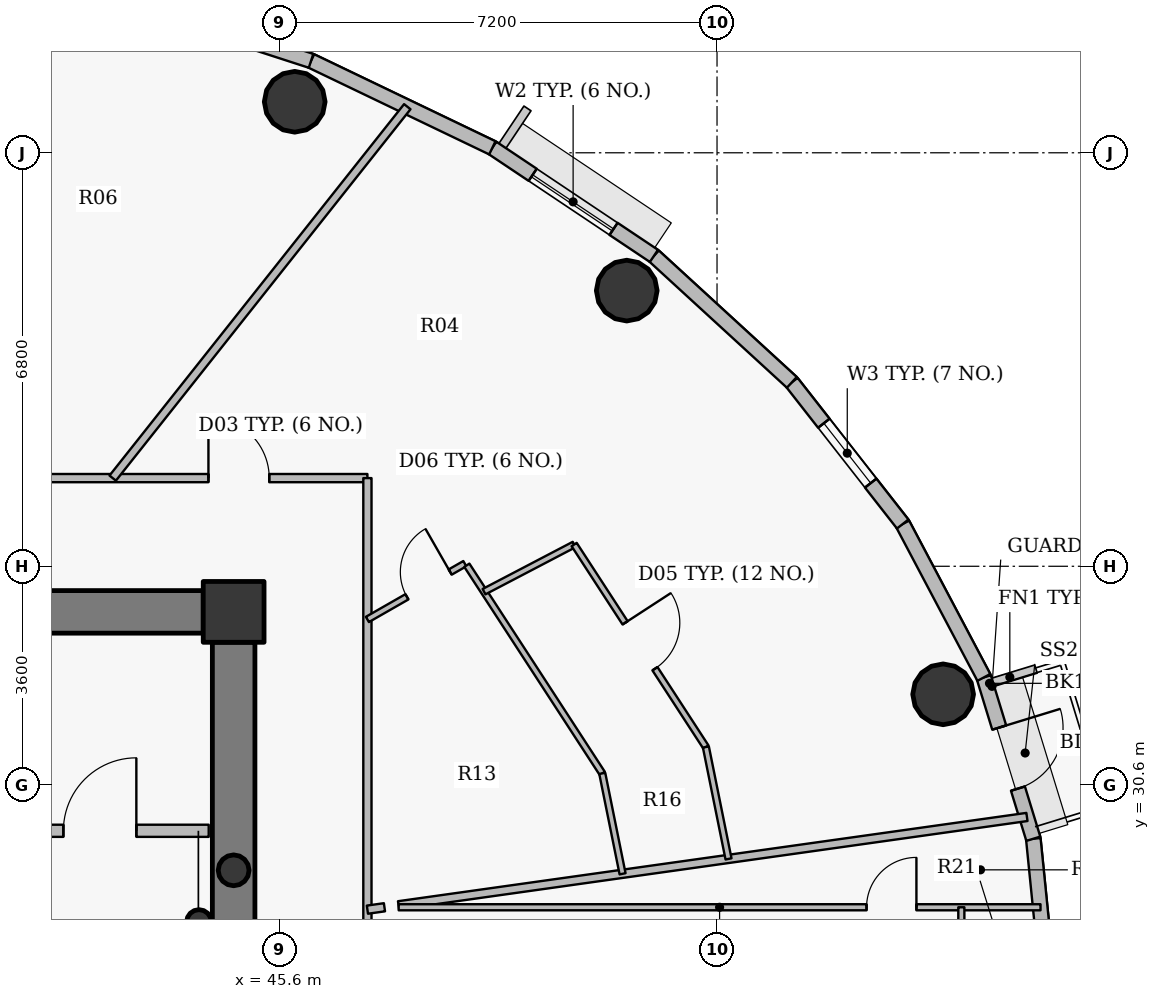
"""IFC4 building model, lengths in metres.
Left out: names, types, materials, properties, quantities, classifications, styles, units other than length and angle.
Written with IfcOpenShell. Run it as: python <this file> out.ifc"""

import sys

from ifc_helpers import new_model, si_unit, direction, frame, frame_2d, origin, origin_2d, place, context, subcontext, project, spatial, rectangle, hollow_circle, extrude, source, transform, mapped, element, fill, save


model = new_model("IFC4")
c1 = context("Model", 3, precision=1e-05, world=origin(), true_north=direction((0.0, 1.0)))
c2 = subcontext(c1, "Body", "Model", "MODEL_VIEW")
j1 = project(units=[si_unit("LENGTHUNIT", "METRE"), si_unit("PLANEANGLEUNIT", "RADIAN")], contexts=[c1])
p1 = place(None, origin())
s1 = spatial("IfcSite", under=j1, at=p1, CompositionType="ELEMENT")
p2 = place(p1, origin())
s2 = spatial("IfcBuilding", under=s1, at=p2, CompositionType="ELEMENT")
p3 = place(p2, frame((0.0, 0.0, 280.5)))
s3 = spatial("IfcBuildingStorey", under=s2, at=p3, CompositionType="ELEMENT", Elevation=280.5)
p4 = place(p3, frame((44.85, 33.45, 0.0), z_axis=(0.0, 0.0, 1.0), x_axis=(1.0, 0.0, 0.0)))
e1 = element("IfcColumn", 1, at=p4, inside=s3, PredefinedType="COLUMN", context=c2, shape_type="SweptSolid", body=[
    extrude(rectangle(XDim=1.0, YDim=1.0, at=origin_2d()), origin(), (0.0, 0.0, 1.0), 3.75),
])
p5 = place(p3, frame((44.28, 28.35, 0.0), z_axis=(0.0, 0.0, 1.0), x_axis=(1.0, 0.0, 0.0)))
e2 = element("IfcColumn", 2, at=p5, inside=s3, PredefinedType="COLUMN", context=c2, shape_type="SweptSolid", body=[
    extrude(hollow_circle(Radius=0.203, WallThickness=0.016, at=origin_2d()), origin(), (0.0, 0.0, 1.0), 3.75),
])
p6 = place(p3, frame((27.65, 33.45, 0.0), z_axis=(0.0, 0.0, 1.0), x_axis=(1.0, 0.0, 0.0)))
e3 = element("IfcWall", 3, at=p6, inside=s3, PredefinedType="SHEAR", context=c2, shape_type="SweptSolid", body=[
    extrude(rectangle(XDim=16.7, YDim=0.7, at=frame_2d((8.35, 0.0))), origin(), (0.0, 0.0, 1.0), 3.05),
])
p7 = place(p6, frame((12.775, 0.0, 0.0)))
e4 = element("IfcOpeningElement", 4, at=p7, cuts=e3, PredefinedType="OPENING", context=c2, shape_type="SweptSolid", body=[
    extrude(rectangle(XDim=1.15, YDim=2.15, at=origin_2d()), frame((0.575, 0.36, 1.075), z_axis=(0.0, -1.0, 0.0), x_axis=(1.0, 0.0, 0.0)), (0.0, 0.0, 1.0), 0.72),
])
p8 = place(p3, frame((44.85, 32.95, 0.0), z_axis=(0.0, 0.0, 1.0), x_axis=(0.0, -1.0, 0.0)))
e5 = element("IfcWall", 5, at=p8, inside=s3, PredefinedType="SHEAR", context=c2, shape_type="SweptSolid", body=[
    extrude(rectangle(XDim=11.9, YDim=0.7, at=frame_2d((5.95, 0.0))), origin(), (0.0, 0.0, 1.0), 3.05),
])
for number, where, z_axis, x_axis in (
    (6, (56.519, 32.094, 0.0), (0.0, 0.0, 1.0), (1.0, 0.0, 0.0)),
    (7, (51.315, 38.733, 0.0), (0.0, 0.0, 1.0), (1.0, 0.0, 0.0)),
    (8, (45.854, 41.839, 0.0), (0.0, 0.0, 1.0), (1.0, 0.0, 0.0)),
):
    element("IfcColumn", number, at=place(p3, frame(where, z_axis=z_axis, x_axis=x_axis)), inside=s3, PredefinedType="COLUMN", context=c2, shape_type="SweptSolid", body=[
        extrude(hollow_circle(Radius=0.5, WallThickness=0.032, at=origin_2d()), origin(), (0.0, 0.0, 1.0), 3.75),
    ])
p9 = place(p3, frame((44.85, 29.2, 0.0), z_axis=(0.0, 0.0, 1.0), x_axis=(1.0, 0.0, 0.0)))
e9 = element("IfcColumn", 9, at=p9, inside=s3, PredefinedType="COLUMN", context=c2, shape_type="SweptSolid", body=[
    extrude(hollow_circle(Radius=0.254, WallThickness=0.02, at=origin_2d()), origin(), (0.0, 0.0, 1.0), 3.75),
])
p10 = place(p3, frame((58.002, 29.719, 0.0), z_axis=(0.0, 0.0, 1.0), x_axis=(0.099972526841, -0.99499019788, 0.0)))
e10 = element("IfcWall", 10, at=p10, inside=s3, PredefinedType="SOLIDWALL", context=c2, shape_type="SweptSolid", body=[
    extrude(rectangle(XDim=2.733, YDim=0.24, at=frame_2d((1.366, 0.0))), origin(), (0.0, 0.0, 1.0), 3.5),
])
p11 = place(p3, frame((57.188, 32.372, 0.0), z_axis=(0.0, 0.0, 1.0), x_axis=(0.2931213403, -0.956075248012, 0.0)))
e11 = element("IfcWall", 11, at=p11, inside=s3, PredefinedType="SOLIDWALL", context=c2, shape_type="SweptSolid", body=[
    extrude(rectangle(XDim=2.775, YDim=0.24, at=frame_2d((1.388, 0.0))), origin(), (0.0, 0.0, 1.0), 3.5),
])
p12 = place(p11, frame((0.863, 0.0, 0.0)))
e12 = element("IfcOpeningElement", 12, at=p12, cuts=e11, PredefinedType="OPENING", context=c2, shape_type="SweptSolid", body=[
    extrude(rectangle(XDim=1.05, YDim=2.15, at=origin_2d()), frame((0.525, 0.13, 1.075), z_axis=(0.0, -1.0, 0.0), x_axis=(1.0, 0.0, 0.0)), (0.0, 0.0, 1.0), 0.26),
])
p13 = place(p3, frame((55.854, 34.895, 0.0), z_axis=(0.0, 0.0, 1.0), x_axis=(0.467628269026, -0.883925224218, 0.0)))
e13 = element("IfcWall", 13, at=p13, inside=s3, PredefinedType="SOLIDWALL", context=c2, shape_type="SweptSolid", body=[
    extrude(rectangle(XDim=2.854, YDim=0.24, at=frame_2d((1.427, 0.0))), origin(), (0.0, 0.0, 1.0), 3.5),
])
p14 = place(p3, frame((54.03, 37.225, 0.0), z_axis=(0.0, 0.0, 1.0), x_axis=(0.616337186556, -0.787482363275, 0.0)))
e14 = element("IfcWall", 14, at=p14, inside=s3, PredefinedType="SOLIDWALL", context=c2, shape_type="SweptSolid", body=[
    extrude(rectangle(XDim=2.958, YDim=0.24, at=frame_2d((1.479, 0.0))), origin(), (0.0, 0.0, 1.0), 3.5),
])
p15 = place(p14, frame((0.854, 0.0, 0.9)))
e15 = element("IfcOpeningElement", 15, at=p15, cuts=e14, PredefinedType="OPENING", context=c2, shape_type="SweptSolid", body=[
    extrude(rectangle(XDim=1.25, YDim=1.65, at=origin_2d()), frame((0.625, 0.13, 0.825), z_axis=(0.0, -1.0, 0.0), x_axis=(1.0, 0.0, 0.0)), (0.0, 0.0, 1.0), 0.26),
])
p16 = place(p3, frame((51.762, 39.304, 0.0), z_axis=(0.0, 0.0, 1.0), x_axis=(0.737068506972, -0.675818034703, 0.0)))
e16 = element("IfcWall", 16, at=p16, inside=s3, PredefinedType="SOLIDWALL", context=c2, shape_type="SweptSolid", body=[
    extrude(rectangle(XDim=3.077, YDim=0.24, at=frame_2d((1.539, 0.0))), origin(), (0.0, 0.0, 1.0), 3.5),
])
p17 = place(p3, frame((49.104, 41.082, 0.0), z_axis=(0.0, 0.0, 1.0), x_axis=(0.831250592635, -0.55589787933, 0.0)))
e17 = element("IfcWall", 17, at=p17, inside=s3, PredefinedType="SOLIDWALL", context=c2, shape_type="SweptSolid", body=[
    extrude(rectangle(XDim=3.197, YDim=0.24, at=frame_2d((1.599, 0.0))), origin(), (0.0, 0.0, 1.0), 3.5),
])
p18 = place(p17, frame((0.798, 0.0, 0.9)))
e18 = element("IfcOpeningElement", 18, at=p18, cuts=e17, PredefinedType="OPENING", context=c2, shape_type="SweptSolid", body=[
    extrude(rectangle(XDim=1.6, YDim=1.75, at=origin_2d()), frame((0.8, 0.13, 0.875), z_axis=(0.0, -1.0, 0.0), x_axis=(1.0, 0.0, 0.0)), (0.0, 0.0, 1.0), 0.26),
])
p19 = place(p3, frame((46.123, 42.512, 0.0), z_axis=(0.0, 0.0, 1.0), x_axis=(0.901573741254, -0.43262546051, 0.0)))
e19 = element("IfcWall", 19, at=p19, inside=s3, PredefinedType="SOLIDWALL", context=c2, shape_type="SweptSolid", body=[
    extrude(rectangle(XDim=3.307, YDim=0.24, at=frame_2d((1.653, 0.0))), origin(), (0.0, 0.0, 1.0), 3.5),
])
p20 = place(p3, frame((42.891, 43.56, 0.0), z_axis=(0.0, 0.0, 1.0), x_axis=(0.95123136723, -0.308478339592, 0.0)))
e20 = element("IfcWall", 20, at=p20, inside=s3, PredefinedType="SOLIDWALL", context=c2, shape_type="SweptSolid", body=[
    extrude(rectangle(XDim=3.398, YDim=0.24, at=frame_2d((1.699, 0.0))), origin(), (0.0, 0.0, 1.0), 3.5),
])
p21 = place(p20, frame((0.899, 0.0, 0.9)))
e21 = element("IfcOpeningElement", 21, at=p21, cuts=e20, PredefinedType="OPENING", context=c2, shape_type="SweptSolid", body=[
    extrude(rectangle(XDim=1.6, YDim=1.75, at=origin_2d()), frame((0.8, 0.13, 0.875), z_axis=(0.0, -1.0, 0.0), x_axis=(1.0, 0.0, 0.0)), (0.0, 0.0, 1.0), 0.26),
])
p22 = place(p3, frame((35.95, 29.85, 0.0), z_axis=(0.0, 0.0, 1.0), x_axis=(1.0, 0.0, 0.0)))
e22 = element("IfcWall", 22, at=p22, inside=s3, PredefinedType="PARTITIONING", context=c2, shape_type="SweptSolid", body=[
    extrude(rectangle(XDim=8.49, YDim=0.2, at=frame_2d((4.245, 0.0))), origin(), (0.0, 0.0, 1.0), 3.085),
])
p23 = place(p22, frame((6.1, 0.0, 0.0)))
e23 = element("IfcOpeningElement", 23, at=p23, cuts=e22, PredefinedType="OPENING", context=c2, shape_type="SweptSolid", body=[
    extrude(rectangle(XDim=1.2, YDim=2.15, at=origin_2d()), frame((0.6, 0.11, 1.075), z_axis=(0.0, -1.0, 0.0), x_axis=(1.0, 0.0, 0.0)), (0.0, 0.0, 1.0), 0.22),
])
p24 = place(p22, frame((0.37, 0.0, 0.0)))
e24 = element("IfcOpeningElement", 24, at=p24, cuts=e22, PredefinedType="OPENING", context=c2, shape_type="SweptSolid", body=[
    extrude(rectangle(XDim=1.15, YDim=2.15, at=origin_2d()), frame((0.575, 0.11, 1.075), z_axis=(0.0, -1.0, 0.0), x_axis=(1.0, 0.0, 0.0)), (0.0, 0.0, 1.0), 0.22),
])
p25 = place(p22, frame((2.425, 0.0, 0.0)))
e25 = element("IfcOpeningElement", 25, at=p25, cuts=e22, PredefinedType="OPENING", context=c2, shape_type="SweptSolid", body=[
    extrude(rectangle(XDim=1.05, YDim=2.15, at=origin_2d()), frame((0.525, 0.11, 1.075), z_axis=(0.0, -1.0, 0.0), x_axis=(1.0, 0.0, 0.0)), (0.0, 0.0, 1.0), 0.22),
])
p26 = place(p3, frame((36.95, 35.65, 0.0), z_axis=(0.0, 0.0, 1.0), x_axis=(1.0, 0.0, 0.0)))
e26 = element("IfcWall", 26, at=p26, inside=s3, PredefinedType="PARTITIONING", context=c2, shape_type="SweptSolid", body=[
    extrude(rectangle(XDim=10.1, YDim=0.135, at=frame_2d((5.05, 0.0))), origin(), (0.0, 0.0, 1.0), 3.035),
])
p27 = place(p26, frame((7.486, 0.0, 0.0)))
e27 = element("IfcOpeningElement", 27, at=p27, cuts=e26, PredefinedType="OPENING", context=c2, shape_type="SweptSolid", body=[
    extrude(rectangle(XDim=1.0, YDim=2.15, at=origin_2d()), frame((0.5, 0.078, 1.075), z_axis=(0.0, -1.0, 0.0), x_axis=(1.0, 0.0, 0.0)), (0.0, 0.0, 1.0), 0.155),
])
p28 = place(p26, frame((3.272, 0.0, 0.0)))
e28 = element("IfcOpeningElement", 28, at=p28, cuts=e26, PredefinedType="OPENING", context=c2, shape_type="SweptSolid", body=[
    extrude(rectangle(XDim=1.0, YDim=2.15, at=origin_2d()), frame((0.5, 0.078, 1.075), z_axis=(0.0, -1.0, 0.0), x_axis=(1.0, 0.0, 0.0)), (0.0, 0.0, 1.0), 0.155),
])
p29 = place(p3, frame((42.861, 35.65, 0.0), z_axis=(0.0, 0.0, 1.0), x_axis=(0.621439784824, 0.783461928774, 0.0)))
e29 = element("IfcWall", 29, at=p29, inside=s3, PredefinedType="PARTITIONING", context=c2, shape_type="SweptSolid", body=[
    extrude(rectangle(XDim=7.796, YDim=0.135, at=frame_2d((3.898, 0.0))), origin(), (0.0, 0.0, 1.0), 2.985),
])
p30 = place(p3, frame((47.05, 18.503, 0.0), z_axis=(0.0, 0.0, 1.0), x_axis=(0.0, 1.0, 0.0)))
e30 = element("IfcWall", 30, at=p30, inside=s3, PredefinedType="PARTITIONING", context=c2, shape_type="SweptSolid", body=[
    extrude(rectangle(XDim=17.147, YDim=0.135, at=frame_2d((8.574, 0.0))), origin(), (0.0, 0.0, 1.0), 3.035),
])
p31 = place(p30, frame((4.545, 0.0, 0.0)))
e31 = element("IfcOpeningElement", 31, at=p31, cuts=e30, PredefinedType="OPENING", context=c2, shape_type="SweptSolid", body=[
    extrude(rectangle(XDim=1.0, YDim=2.15, at=origin_2d()), frame((0.5, 0.078, 1.075), z_axis=(0.0, -1.0, 0.0), x_axis=(1.0, 0.0, 0.0)), (0.0, 0.0, 1.0), 0.155),
])
p32 = place(p3, frame((47.05, 28.553, 0.0), z_axis=(0.0, 0.0, 1.0), x_axis=(0.990308552968, 0.138884736087, 0.0)))
e32 = element("IfcWall", 32, at=p32, inside=s3, PredefinedType="PARTITIONING", context=c2, shape_type="SweptSolid", body=[
    extrude(rectangle(XDim=0.283, YDim=0.135, at=frame_2d((0.142, 0.0))), origin(), (0.0, 0.0, 1.0), 3.5),
])
p33 = place(p3, frame((47.05, 33.326, 0.0), z_axis=(0.0, 0.0, 1.0), x_axis=(0.867827775188, 0.496865125172, 0.0)))
e33 = element("IfcWall", 33, at=p33, inside=s3, PredefinedType="PARTITIONING", context=c2, shape_type="SweptSolid", body=[
    extrude(rectangle(XDim=1.846, YDim=0.1, at=frame_2d((0.923, 0.0))), origin(), (0.0, 0.0, 1.0), 3.5),
])
p34 = place(p33, frame((0.749, 0.0, 0.0)))
e34 = element("IfcOpeningElement", 34, at=p34, cuts=e33, PredefinedType="OPENING", context=c2, shape_type="SweptSolid", body=[
    extrude(rectangle(XDim=0.82, YDim=2.1, at=origin_2d()), frame((0.41, 0.06, 1.05), z_axis=(0.0, -1.0, 0.0), x_axis=(1.0, 0.0, 0.0)), (0.0, 0.0, 1.0), 0.12),
])
p35 = place(p3, frame((47.562, 28.625, 0.0), z_axis=(0.0, 0.0, 1.0), x_axis=(0.990269276455, 0.139164507362, 0.0)))
e35 = element("IfcWall", 35, at=p35, inside=s3, PredefinedType="PARTITIONING", context=c2, shape_type="SweptSolid", body=[
    extrude(rectangle(XDim=10.437, YDim=0.135, at=frame_2d((5.218, 0.0))), origin(), (0.0, 0.0, 1.0), 2.985),
])
p36 = place(p3, frame((47.564, 28.592, 0.0), z_axis=(0.0, 0.0, 1.0), x_axis=(1.0, 0.0, 0.0)))
e36 = element("IfcWall", 36, at=p36, inside=s3, PredefinedType="PARTITIONING", context=c2, shape_type="SweptSolid", body=[
    extrude(rectangle(XDim=10.555, YDim=0.1, at=frame_2d((5.278, 0.0))), origin(), (0.0, 0.0, 1.0), 2.985),
])
p37 = place(p36, frame((7.695, 0.0, 0.0)))
e37 = element("IfcOpeningElement", 37, at=p37, cuts=e36, PredefinedType="OPENING", context=c2, shape_type="SweptSolid", body=[
    extrude(rectangle(XDim=0.82, YDim=2.1, at=origin_2d()), frame((0.41, 0.06, 1.05), z_axis=(0.0, -1.0, 0.0), x_axis=(1.0, 0.0, 0.0)), (0.0, 0.0, 1.0), 0.12),
])
p38 = place(p3, frame((48.685, 34.217, 0.0), z_axis=(0.0, 0.0, 1.0), x_axis=(0.54540855562, -0.8381703332, 0.0)))
e38 = element("IfcWall", 38, at=p38, inside=s3, PredefinedType="PARTITIONING", context=c2, shape_type="SweptSolid", body=[
    extrude(rectangle(XDim=4.084, YDim=0.1, at=frame_2d((2.042, 0.0))), origin(), (0.0, 0.0, 1.0), 3.035),
])
p39 = place(p3, frame((48.968, 33.782, 0.0), z_axis=(0.0, 0.0, 1.0), x_axis=(0.886102824681, 0.463488709779, 0.0)))
e39 = element("IfcWall", 39, at=p39, inside=s3, PredefinedType="PARTITIONING", context=c2, shape_type="SweptSolid", body=[
    extrude(rectangle(XDim=1.672, YDim=0.1, at=frame_2d((0.836, 0.0))), origin(), (0.0, 0.0, 1.0), 3.5),
])
p40 = place(p3, frame((50.45, 34.558, 0.0), z_axis=(0.0, 0.0, 1.0), x_axis=(0.545448348881, -0.838144437853, 0.0)))
e40 = element("IfcWall", 40, at=p40, inside=s3, PredefinedType="PARTITIONING", context=c2, shape_type="SweptSolid", body=[
    extrude(rectangle(XDim=3.973, YDim=0.1, at=frame_2d((1.986, 0.0))), origin(), (0.0, 0.0, 1.0), 3.035),
])
p41 = place(p40, frame((1.536, 0.0, 0.0)))
e41 = element("IfcOpeningElement", 41, at=p41, cuts=e40, PredefinedType="OPENING", context=c2, shape_type="SweptSolid", body=[
    extrude(rectangle(XDim=0.9, YDim=2.1, at=origin_2d()), frame((0.45, 0.06, 1.05), z_axis=(0.0, -1.0, 0.0), x_axis=(1.0, 0.0, 0.0)), (0.0, 0.0, 1.0), 0.12),
])
p42 = place(p3, frame((50.913, 30.794, 0.0), z_axis=(0.0, 0.0, 1.0), x_axis=(0.198233557602, -0.980154812588, 0.0)))
e42 = element("IfcWall", 42, at=p42, inside=s3, PredefinedType="PARTITIONING", context=c2, shape_type="SweptSolid", body=[
    extrude(rectangle(XDim=1.685, YDim=0.1, at=frame_2d((0.842, 0.0))), origin(), (0.0, 0.0, 1.0), 3.035),
])
p43 = place(p3, frame((52.617, 31.228, 0.0), z_axis=(0.0, 0.0, 1.0), x_axis=(0.198191443997, -0.980163329005, 0.0)))
e43 = element("IfcWall", 43, at=p43, inside=s3, PredefinedType="PARTITIONING", context=c2, shape_type="SweptSolid", body=[
    extrude(rectangle(XDim=1.877, YDim=0.1, at=frame_2d((0.939, 0.0))), origin(), (0.0, 0.0, 1.0), 3.035),
])
p44 = place(p3, frame((56.818, 20.917, 0.0), z_axis=(0.0, 0.0, 1.0), x_axis=(0.0, 1.0, 0.0)))
e44 = element("IfcWall", 44, at=p44, inside=s3, PredefinedType="PARTITIONING", context=c2, shape_type="SweptSolid", body=[
    extrude(rectangle(XDim=7.675, YDim=0.1, at=frame_2d((3.837, 0.0))), origin(), (0.0, 0.0, 1.0), 2.985),
])
p45 = place(p44, frame((3.388, 0.0, 0.0)))
e45 = element("IfcOpeningElement", 45, at=p45, cuts=e44, PredefinedType="OPENING", context=c2, shape_type="SweptSolid", body=[
    extrude(rectangle(XDim=0.9, YDim=2.1, at=origin_2d()), frame((0.45, 0.06, 1.05), z_axis=(0.0, -1.0, 0.0), x_axis=(1.0, 0.0, 0.0)), (0.0, 0.0, 1.0), 0.12),
])
p46 = place(p3, frame((45.2, 33.8, 0.0), z_axis=(0.0, 0.0, 1.0), x_axis=(-1.0, 0.0, 0.0)))
e46 = element("IfcWall", 46, at=p46, inside=s3, PredefinedType="PARTITIONING", context=c2, shape_type="SweptSolid", body=[
    extrude(rectangle(XDim=0.84, YDim=0.135, at=frame_2d((0.42, 0.0))), origin(), (0.0, 0.0, 1.0), 3.035),
])
p47 = place(p3, frame((45.2, 32.96, 0.0), z_axis=(0.0, 0.0, 1.0), x_axis=(0.0, 1.0, 0.0)))
e47 = element("IfcWall", 47, at=p47, inside=s3, PredefinedType="PARTITIONING", context=c2, shape_type="SweptSolid", body=[
    extrude(rectangle(XDim=0.532, YDim=0.135, at=frame_2d((0.266, 0.0))), origin(), (0.0, 0.0, 1.0), 3.5),
])
m1 = source(origin(), c2, "Body", "SweptSolid", [
    extrude(rectangle(XDim=1.05, YDim=2.15, at=origin_2d()), frame((0.525, 0.025, 1.075), z_axis=(0.0, -1.0, 0.0), x_axis=(1.0, 0.0, 0.0)), (0.0, 0.0, 1.0), 0.05),
])
p48 = place(p12, origin())
e48 = element("IfcDoor", 48, at=p48, inside=s3, OperationType="SINGLE_SWING_LEFT", PredefinedType="DOOR", context=c2, shape_type="MappedRepresentation", body=[
    mapped(m1, transform((0.0, 0.0, 0.0), x_axis=(1.0, 0.0, 0.0), y_axis=(0.0, 1.0, 0.0), z_axis=(0.0, 0.0, 1.0), scale=1.0)),
])
fill(e12, e48)
m2 = source(origin(), c2, "Body", "SweptSolid", [
    extrude(rectangle(XDim=1.25, YDim=1.65, at=origin_2d()), frame((0.625, 0.03, 0.825), z_axis=(0.0, -1.0, 0.0), x_axis=(1.0, 0.0, 0.0)), (0.0, 0.0, 1.0), 0.06),
])
p49 = place(p15, origin())
e49 = element("IfcWindow", 49, at=p49, inside=s3, PartitioningType="SINGLE_PANEL", PredefinedType="WINDOW", context=c2, shape_type="MappedRepresentation", body=[
    mapped(m2, transform((0.0, 0.0, 0.0), x_axis=(1.0, 0.0, 0.0), y_axis=(0.0, 1.0, 0.0), z_axis=(0.0, 0.0, 1.0), scale=1.0)),
])
fill(e15, e49)
m3 = source(origin(), c2, "Body", "SweptSolid", [
    extrude(rectangle(XDim=1.6, YDim=1.75, at=origin_2d()), frame((0.8, 0.03, 0.875), z_axis=(0.0, -1.0, 0.0), x_axis=(1.0, 0.0, 0.0)), (0.0, 0.0, 1.0), 0.06),
])
p50 = place(p18, origin())
e50 = element("IfcWindow", 50, at=p50, inside=s3, PartitioningType="DOUBLE_PANEL_VERTICAL", PredefinedType="WINDOW", context=c2, shape_type="MappedRepresentation", body=[
    mapped(m3, transform((0.0, 0.0, 0.0), x_axis=(1.0, 0.0, 0.0), y_axis=(0.0, 1.0, 0.0), z_axis=(0.0, 0.0, 1.0), scale=1.0)),
])
fill(e18, e50)
m4 = source(origin(), c2, "Body", "SweptSolid", [
    extrude(rectangle(XDim=1.2, YDim=2.15, at=origin_2d()), frame((0.6, 0.025, 1.075), z_axis=(0.0, -1.0, 0.0), x_axis=(1.0, 0.0, 0.0)), (0.0, 0.0, 1.0), 0.05),
])
p51 = place(p23, origin())
e51 = element("IfcDoor", 51, at=p51, inside=s3, OperationType="SINGLE_SWING_RIGHT", PredefinedType="DOOR", context=c2, shape_type="MappedRepresentation", body=[
    mapped(m4, transform((0.0, 0.0, 0.0), x_axis=(1.0, 0.0, 0.0), y_axis=(0.0, 1.0, 0.0), z_axis=(0.0, 0.0, 1.0), scale=1.0)),
])
fill(e23, e51)
m5 = source(origin(), c2, "Body", "SweptSolid", [
    extrude(rectangle(XDim=1.0, YDim=2.15, at=origin_2d()), frame((0.5, 0.025, 1.075), z_axis=(0.0, -1.0, 0.0), x_axis=(1.0, 0.0, 0.0)), (0.0, 0.0, 1.0), 0.05),
])
p52 = place(p27, origin())
e52 = element("IfcDoor", 52, at=p52, inside=s3, OperationType="SINGLE_SWING_LEFT", PredefinedType="DOOR", context=c2, shape_type="MappedRepresentation", body=[
    mapped(m5, transform((0.0, 0.0, 0.0), x_axis=(1.0, 0.0, 0.0), y_axis=(0.0, 1.0, 0.0), z_axis=(0.0, 0.0, 1.0), scale=1.0)),
])
fill(e27, e52)
m6 = source(origin(), c2, "Body", "SweptSolid", [
    extrude(rectangle(XDim=0.82, YDim=2.1, at=origin_2d()), frame((0.41, 0.025, 1.05), z_axis=(0.0, -1.0, 0.0), x_axis=(1.0, 0.0, 0.0)), (0.0, 0.0, 1.0), 0.05),
])
p53 = place(p34, origin())
e53 = element("IfcDoor", 53, at=p53, inside=s3, OperationType="SINGLE_SWING_RIGHT", PredefinedType="DOOR", context=c2, shape_type="MappedRepresentation", body=[
    mapped(m6, transform((0.0, 0.0, 0.0), x_axis=(1.0, 0.0, 0.0), y_axis=(0.0, 1.0, 0.0), z_axis=(0.0, 0.0, 1.0), scale=1.0)),
])
fill(e34, e53)
m7 = source(origin(), c2, "Body", "SweptSolid", [
    extrude(rectangle(XDim=0.9, YDim=2.1, at=origin_2d()), frame((0.45, 0.025, 1.05), z_axis=(0.0, -1.0, 0.0), x_axis=(1.0, 0.0, 0.0)), (0.0, 0.0, 1.0), 0.05),
])
p54 = place(p41, origin())
e54 = element("IfcDoor", 54, at=p54, inside=s3, OperationType="SINGLE_SWING_LEFT", PredefinedType="DOOR", context=c2, shape_type="MappedRepresentation", body=[
    mapped(m7, transform((0.0, 0.0, 0.0), x_axis=(1.0, 0.0, 0.0), y_axis=(0.0, 1.0, 0.0), z_axis=(0.0, 0.0, 1.0), scale=1.0)),
])
fill(e41, e54)
p55 = place(p37, origin())
e55 = element("IfcDoor", 55, at=p55, inside=s3, OperationType="SINGLE_SWING_RIGHT", PredefinedType="DOOR", context=c2, shape_type="MappedRepresentation", body=[
    mapped(m6, transform((0.0, 0.0, 0.0), x_axis=(1.0, 0.0, 0.0), y_axis=(0.0, 1.0, 0.0), z_axis=(0.0, 0.0, 1.0), scale=1.0)),
])
fill(e37, e55)
save(model, sys.argv[1])
